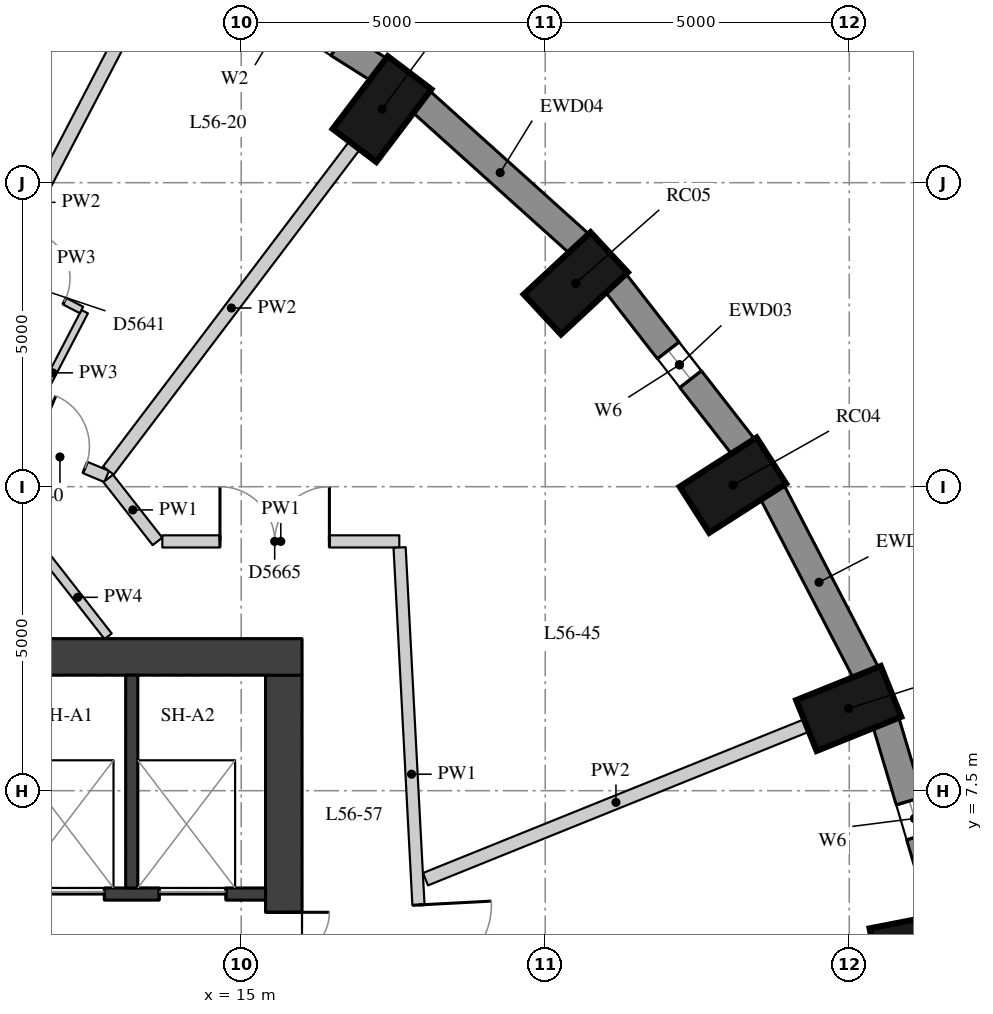
"""IFC4 building model, lengths in metres.
Left out: names, types, materials, properties, quantities, classifications, styles, units other than length and angle.
Written with IfcOpenShell. Run it as: python <this file> out.ifc"""

import sys

from ifc_helpers import new_model, si_unit, direction, frame, frame_2d, origin, origin_2d, place, context, subcontext, project, spatial, rectangle, extrude, element, fill, save


model = new_model("IFC4")
c1 = context("Model", 3, precision=1e-05, world=origin(), true_north=direction((0.0, 1.0)))
c2 = subcontext(c1, "Body", "Model", "MODEL_VIEW")
j1 = project(units=[si_unit("LENGTHUNIT", "METRE"), si_unit("PLANEANGLEUNIT", "RADIAN")], contexts=[c1])
p1 = place(None, origin())
s1 = spatial("IfcSite", under=j1, at=p1, CompositionType="ELEMENT")
p2 = place(p1, origin())
s2 = spatial("IfcBuilding", under=s1, at=p2, CompositionType="ELEMENT")
p3 = place(p2, frame((0.0, 0.0, 199.1)))
s3 = spatial("IfcBuildingStorey", under=s2, at=p3, CompositionType="ELEMENT", Elevation=199.1)
for number, where, z_axis, x_axis in (
    (1, (26.157, 4.937, 0.0), (0.0, 0.0, 1.0), (0.981, 0.192, 0.0)),
    (2, (24.991, 8.852, 0.0), (0.0, 0.0, 1.0), (0.927, 0.374, 0.0)),
    (3, (23.087, 12.525, 0.0), (0.0, 0.0, 1.0), (0.842, 0.539, 0.0)),
    (4, (20.502, 15.845, 0.0), (0.0, 0.0, 1.0), (0.732, 0.681, 0.0)),
    (5, (17.316, 18.71, 0.0), (0.0, 0.0, 1.0), (0.604, 0.797, 0.0)),
):
    element("IfcColumn", number, at=place(p3, frame(where, z_axis=z_axis, x_axis=x_axis)), inside=s3, PredefinedType="COLUMN", context=c2, shape_type="SweptSolid", body=[
        extrude(rectangle(XDim=1.5, YDim=0.9, at=origin_2d()), origin(), (0.0, 0.0, 1.0), 3.3),
    ])
p4 = place(p3, frame((26.548, 5.452, 0.0), z_axis=(0.0, 0.0, 1.0), x_axis=(-0.285444972963, 0.958395099847, 0.0)))
e6 = element("IfcWall", 6, at=p4, inside=s3, PredefinedType="SOLIDWALL", context=c2, shape_type="SweptSolid", body=[
    extrude(rectangle(XDim=3.32, YDim=0.45, at=frame_2d((1.66, 0.0))), origin(), (0.0, 0.0, 1.0), 3.02),
])
p5 = place(p4, frame((1.36, 0.0, 0.4)))
e7 = element("IfcOpeningElement", 7, at=p5, cuts=e6, PredefinedType="OPENING", context=c2, shape_type="SweptSolid", body=[
    extrude(rectangle(XDim=0.6, YDim=1.75, at=frame_2d((0.3, 0.875))), frame((0.0, 0.235, 0.0), z_axis=(0.0, -1.0, 0.0), x_axis=(1.0, 0.0, 0.0)), (0.0, 0.0, 1.0), 0.47),
])
p6 = place(p3, frame((25.278, 9.432, 0.0), z_axis=(0.0, 0.0, 1.0), x_axis=(-0.460175500475, 0.887827972505, 0.0)))
e8 = element("IfcWall", 8, at=p6, inside=s3, PredefinedType="SOLIDWALL", context=c2, shape_type="SweptSolid", body=[
    extrude(rectangle(XDim=3.371, YDim=0.45, at=frame_2d((1.685, 0.0))), origin(), (0.0, 0.0, 1.0), 3.02),
])
p7 = place(p3, frame((23.263, 13.148, 0.0), z_axis=(0.0, 0.0, 1.0), x_axis=(-0.614220816451, 0.789134201919, 0.0)))
e9 = element("IfcWall", 9, at=p7, inside=s3, PredefinedType="SOLIDWALL", context=c2, shape_type="SweptSolid", body=[
    extrude(rectangle(XDim=3.438, YDim=0.45, at=frame_2d((1.719, 0.0))), origin(), (0.0, 0.0, 1.0), 3.02),
])
p8 = place(p7, frame((1.419, 0.0, 0.4)))
e10 = element("IfcOpeningElement", 10, at=p8, cuts=e9, PredefinedType="OPENING", context=c2, shape_type="SweptSolid", body=[
    extrude(rectangle(XDim=0.6, YDim=1.75, at=frame_2d((0.3, 0.875))), frame((0.0, 0.235, 0.0), z_axis=(0.0, -1.0, 0.0), x_axis=(1.0, 0.0, 0.0)), (0.0, 0.0, 1.0), 0.47),
])
p9 = place(p3, frame((20.565, 16.49, 0.0), z_axis=(0.0, 0.0, 1.0), x_axis=(-0.743442727602, 0.668799604348, 0.0)))
e11 = element("IfcWall", 11, at=p9, inside=s3, PredefinedType="SOLIDWALL", context=c2, shape_type="SweptSolid", body=[
    extrude(rectangle(XDim=3.513, YDim=0.45, at=frame_2d((1.756, 0.0))), origin(), (0.0, 0.0, 1.0), 3.02),
])
p10 = place(p3, frame((17.267, 19.358, 0.0), z_axis=(0.0, 0.0, 1.0), x_axis=(-0.846119146727, 0.532993798783, 0.0)))
e12 = element("IfcWall", 12, at=p10, inside=s3, PredefinedType="SOLIDWALL", context=c2, shape_type="SweptSolid", body=[
    extrude(rectangle(XDim=3.587, YDim=0.45, at=frame_2d((1.793, 0.0))), origin(), (0.0, 0.0, 1.0), 3.02),
])
p11 = place(p10, frame((0.793, 0.0, 0.4)))
e13 = element("IfcOpeningElement", 13, at=p11, cuts=e12, PredefinedType="OPENING", context=c2, shape_type="SweptSolid", body=[
    extrude(rectangle(XDim=2.0, YDim=1.75, at=frame_2d((1.0, 0.875))), frame((0.0, 0.235, 0.0), z_axis=(0.0, -1.0, 0.0), x_axis=(1.0, 0.0, 0.0)), (0.0, 0.0, 1.0), 0.47),
])
p12 = place(p3, frame((15.7, -9.4, 0.0), z_axis=(0.0, 0.0, 1.0), x_axis=(0.0, 1.0, 0.0)))
e14 = element("IfcWall", 14, at=p12, inside=s3, PredefinedType="SHEAR", context=c2, shape_type="SweptSolid", body=[
    extrude(rectangle(XDim=18.8, YDim=0.6, at=frame_2d((9.4, 0.0))), origin(), (0.0, 0.0, 1.0), 3.02),
])
p13 = place(p12, frame((13.4, 0.0, 0.0)))
e15 = element("IfcOpeningElement", 15, at=p13, cuts=e14, PredefinedType="OPENING", context=c2, shape_type="SweptSolid", body=[
    extrude(rectangle(XDim=1.5, YDim=2.1, at=frame_2d((0.75, 1.05))), frame((0.0, 0.31, 0.0), z_axis=(0.0, -1.0, 0.0), x_axis=(1.0, 0.0, 0.0)), (0.0, 0.0, 1.0), 0.62),
])
p14 = place(p12, frame((3.9, 0.0, 0.0)))
e16 = element("IfcOpeningElement", 16, at=p14, cuts=e14, PredefinedType="OPENING", context=c2, shape_type="SweptSolid", body=[
    extrude(rectangle(XDim=1.5, YDim=2.1, at=frame_2d((0.75, 1.05))), frame((0.0, 0.31, 0.0), z_axis=(0.0, -1.0, 0.0), x_axis=(1.0, 0.0, 0.0)), (0.0, 0.0, 1.0), 0.62),
])
p15 = place(p3, frame((4.0, 9.7, 0.0), z_axis=(0.0, 0.0, 1.0), x_axis=(1.0, 0.0, 0.0)))
e17 = element("IfcWall", 17, at=p15, inside=s3, PredefinedType="SHEAR", context=c2, shape_type="SweptSolid", body=[
    extrude(rectangle(XDim=12.0, YDim=0.6, at=frame_2d((6.0, 0.0))), origin(), (0.0, 0.0, 1.0), 3.02),
])
p16 = place(p3, frame((4.6, 5.8, 0.0), z_axis=(0.0, 0.0, 1.0), x_axis=(1.0, 0.0, 0.0)))
e18 = element("IfcWall", 18, at=p16, inside=s3, PredefinedType="SHEAR", context=c2, shape_type="SweptSolid", body=[
    extrude(rectangle(XDim=10.8, YDim=0.2, at=frame_2d((5.4, 0.0))), origin(), (0.0, 0.0, 1.0), 3.02),
])
p17 = place(p16, frame((7.05, 0.0, 0.0)))
e19 = element("IfcOpeningElement", 19, at=p17, cuts=e18, PredefinedType="OPENING", context=c2, shape_type="SweptSolid", body=[
    extrude(rectangle(XDim=1.1, YDim=2.1, at=frame_2d((0.55, 1.05))), frame((0.0, 0.11, 0.0), z_axis=(0.0, -1.0, 0.0), x_axis=(1.0, 0.0, 0.0)), (0.0, 0.0, 1.0), 0.22),
])
p18 = place(p16, frame((9.05, 0.0, 0.0)))
e20 = element("IfcOpeningElement", 20, at=p18, cuts=e18, PredefinedType="OPENING", context=c2, shape_type="SweptSolid", body=[
    extrude(rectangle(XDim=1.1, YDim=2.1, at=frame_2d((0.55, 1.05))), frame((0.0, 0.11, 0.0), z_axis=(0.0, -1.0, 0.0), x_axis=(1.0, 0.0, 0.0)), (0.0, 0.0, 1.0), 0.22),
])
p19 = place(p3, frame((13.2, 5.9, 0.0), z_axis=(0.0, 0.0, 1.0), x_axis=(0.0, 1.0, 0.0)))
e21 = element("IfcWall", 21, at=p19, inside=s3, PredefinedType="SHEAR", context=c2, shape_type="SweptSolid", body=[
    extrude(rectangle(XDim=3.5, YDim=0.2, at=frame_2d((1.75, 0.0))), origin(), (0.0, 0.0, 1.0), 3.02),
])
p20 = place(p3, frame((4.052, 16.323, 0.0), z_axis=(0.0, 0.0, 1.0), x_axis=(0.922513794011, -0.385964117322, 0.0)))
e22 = element("IfcWall", 22, at=p20, inside=s3, PredefinedType="PARTITIONING", context=c2, shape_type="SweptSolid", body=[
    extrude(rectangle(XDim=9.47, YDim=0.2, at=frame_2d((4.735, 0.0))), origin(), (0.0, 0.0, 1.0), 3.02),
])
p21 = place(p20, frame((8.186, 0.0, 0.0)))
e23 = element("IfcOpeningElement", 23, at=p21, cuts=e22, PredefinedType="OPENING", context=c2, shape_type="SweptSolid", body=[
    extrude(rectangle(XDim=0.9, YDim=2.1, at=frame_2d((0.45, 1.05))), frame((0.0, 0.11, 0.0), z_axis=(0.0, -1.0, 0.0), x_axis=(1.0, 0.0, 0.0)), (0.0, 0.0, 1.0), 0.22),
])
p22 = place(p20, frame((2.639, 0.0, 0.0)))
e24 = element("IfcOpeningElement", 24, at=p22, cuts=e22, PredefinedType="OPENING", context=c2, shape_type="SweptSolid", body=[
    extrude(rectangle(XDim=1.1, YDim=2.1, at=frame_2d((0.55, 1.05))), frame((0.0, 0.11, 0.0), z_axis=(0.0, -1.0, 0.0), x_axis=(1.0, 0.0, 0.0)), (0.0, 0.0, 1.0), 0.22),
])
p23 = place(p3, frame((12.812, 12.636, 0.0), z_axis=(0.0, 0.0, 1.0), x_axis=(0.616123044723, -0.787649918277, 0.0)))
e25 = element("IfcWall", 25, at=p23, inside=s3, PredefinedType="PARTITIONING", context=c2, shape_type="SweptSolid", body=[
    extrude(rectangle(XDim=1.315, YDim=0.2, at=frame_2d((0.658, 0.0))), origin(), (0.0, 0.0, 1.0), 3.02),
])
p24 = place(p3, frame((13.703, 11.6, 0.0), z_axis=(0.0, 0.0, 1.0), x_axis=(1.0, 0.0, 0.0)))
e26 = element("IfcWall", 26, at=p24, inside=s3, PredefinedType="PARTITIONING", context=c2, shape_type="SweptSolid", body=[
    extrude(rectangle(XDim=3.897, YDim=0.2, at=frame_2d((1.949, 0.0))), origin(), (0.0, 0.0, 1.0), 3.02),
])
p25 = place(p24, frame((0.948, 0.0, 0.0)))
e27 = element("IfcOpeningElement", 27, at=p25, cuts=e26, PredefinedType="OPENING", context=c2, shape_type="SweptSolid", body=[
    extrude(rectangle(XDim=1.8, YDim=2.1, at=frame_2d((0.9, 1.05))), frame((0.0, 0.11, 0.0), z_axis=(0.0, -1.0, 0.0), x_axis=(1.0, 0.0, 0.0)), (0.0, 0.0, 1.0), 0.22),
])
p26 = place(p3, frame((17.605, 11.5, 0.0), z_axis=(0.0, 0.0, 1.0), x_axis=(0.052701255232, -0.998610323248, 0.0)))
e28 = element("IfcWall", 28, at=p26, inside=s3, PredefinedType="PARTITIONING", context=c2, shape_type="SweptSolid", body=[
    extrude(rectangle(XDim=7.468, YDim=0.2, at=frame_2d((3.734, 0.0))), origin(), (0.0, 0.0, 1.0), 3.02),
])
p27 = place(p26, frame((5.887, 0.0, 0.0)))
e29 = element("IfcOpeningElement", 29, at=p27, cuts=e28, PredefinedType="OPENING", context=c2, shape_type="SweptSolid", body=[
    extrude(rectangle(XDim=1.2, YDim=2.1, at=frame_2d((0.6, 1.05))), frame((0.0, 0.11, 0.0), z_axis=(0.0, -1.0, 0.0), x_axis=(1.0, 0.0, 0.0)), (0.0, 0.0, 1.0), 0.22),
])
p28 = place(p3, frame((11.81, 11.321, 0.0), z_axis=(0.0, 0.0, 1.0), x_axis=(0.615964296608, -0.787774069962, 0.0)))
e30 = element("IfcWall", 30, at=p28, inside=s3, PredefinedType="PARTITIONING", context=c2, shape_type="SweptSolid", body=[
    extrude(rectangle(XDim=1.627, YDim=0.15, at=frame_2d((0.813, 0.0))), origin(), (0.0, 0.0, 1.0), 3.02),
])
p29 = place(p3, frame((24.295, 8.571, 0.0), z_axis=(0.0, 0.0, 1.0), x_axis=(-0.927395972896, -0.374081153571, 0.0)))
e31 = element("IfcWall", 31, at=p29, inside=s3, PredefinedType="PARTITIONING", context=c2, shape_type="SweptSolid", body=[
    extrude(rectangle(XDim=6.755, YDim=0.22, at=frame_2d((3.377, 0.0))), origin(), (0.0, 0.0, 1.0), 3.02),
])
p30 = place(p3, frame((16.863, 18.113, 0.0), z_axis=(0.0, 0.0, 1.0), x_axis=(-0.603604669643, -0.797283765535, 0.0)))
e32 = element("IfcWall", 32, at=p30, inside=s3, PredefinedType="PARTITIONING", context=c2, shape_type="SweptSolid", body=[
    extrude(rectangle(XDim=6.707, YDim=0.22, at=frame_2d((3.354, 0.0))), origin(), (0.0, 0.0, 1.0), 3.02),
])
p31 = place(p3, frame((13.279, 20.37, 0.0), z_axis=(0.0, 0.0, 1.0), x_axis=(-0.462003878414, -0.886877903846, 0.0)))
e33 = element("IfcWall", 33, at=p31, inside=s3, PredefinedType="PARTITIONING", context=c2, shape_type="SweptSolid", body=[
    extrude(rectangle(XDim=7.2, YDim=0.22, at=frame_2d((3.6, 0.0))), origin(), (0.0, 0.0, 1.0), 3.02),
])
p32 = place(p3, frame((11.378, 13.366, 0.0), z_axis=(0.0, 0.0, 1.0), x_axis=(0.461999655972, 0.886880103442, 0.0)))
e34 = element("IfcWall", 34, at=p32, inside=s3, PredefinedType="PARTITIONING", context=c2, shape_type="SweptSolid", body=[
    extrude(rectangle(XDim=2.269, YDim=0.12, at=frame_2d((1.135, 0.0))), origin(), (0.0, 0.0, 1.0), 3.02),
])
p33 = place(p3, frame((12.373, 15.406, 0.0), z_axis=(0.0, 0.0, 1.0), x_axis=(-0.88690955386, 0.461943116922, 0.0)))
e35 = element("IfcWall", 35, at=p33, inside=s3, PredefinedType="PARTITIONING", context=c2, shape_type="SweptSolid", body=[
    extrude(rectangle(XDim=1.38, YDim=0.12, at=frame_2d((0.69, 0.0))), origin(), (0.0, 0.0, 1.0), 3.02),
])
p34 = place(p33, frame((0.315, 0.0, 0.0)))
e36 = element("IfcOpeningElement", 36, at=p34, cuts=e35, PredefinedType="OPENING", context=c2, shape_type="SweptSolid", body=[
    extrude(rectangle(XDim=0.8, YDim=2.1, at=frame_2d((0.4, 1.05))), frame((0.0, 0.07, 0.0), z_axis=(0.0, -1.0, 0.0), x_axis=(1.0, 0.0, 0.0)), (0.0, 0.0, 1.0), 0.14),
])
p35 = place(p5, origin())
e37 = element("IfcWindow", 37, at=p35, inside=s3, PartitioningType="SINGLE_PANEL", PredefinedType="WINDOW", context=c2, shape_type="SweptSolid", body=[
    extrude(rectangle(XDim=0.6, YDim=1.75, at=frame_2d((0.3, 0.875))), frame((0.0, 0.035, 0.0), z_axis=(0.0, -1.0, 0.0), x_axis=(1.0, 0.0, 0.0)), (0.0, 0.0, 1.0), 0.06),
])
fill(e7, e37)
p36 = place(p8, origin())
e38 = element("IfcWindow", 38, at=p36, inside=s3, PartitioningType="SINGLE_PANEL", PredefinedType="WINDOW", context=c2, shape_type="SweptSolid", body=[
    extrude(rectangle(XDim=0.6, YDim=1.75, at=frame_2d((0.3, 0.875))), frame((0.0, 0.035, 0.0), z_axis=(0.0, -1.0, 0.0), x_axis=(1.0, 0.0, 0.0)), (0.0, 0.0, 1.0), 0.06),
])
fill(e10, e38)
p37 = place(p13, origin())
e39 = element("IfcDoor", 39, at=p37, inside=s3, OperationType="DOUBLE_DOOR_SINGLE_SWING", PredefinedType="DOOR", context=c2, shape_type="SweptSolid", body=[
    extrude(rectangle(XDim=1.5, YDim=2.1, at=frame_2d((0.75, 1.05))), frame((0.0, 0.025, 0.0), z_axis=(0.0, -1.0, 0.0), x_axis=(1.0, 0.0, 0.0)), (0.0, 0.0, 1.0), 0.05),
])
fill(e15, e39)
p38 = place(p17, origin())
e40 = element("IfcDoor", 40, at=p38, inside=s3, OperationType="DOUBLE_DOOR_SLIDING", PredefinedType="DOOR", context=c2, shape_type="SweptSolid", body=[
    extrude(rectangle(XDim=1.1, YDim=2.1, at=frame_2d((0.55, 1.05))), frame((0.0, 0.025, 0.0), z_axis=(0.0, -1.0, 0.0), x_axis=(1.0, 0.0, 0.0)), (0.0, 0.0, 1.0), 0.05),
])
fill(e19, e40)
p39 = place(p18, origin())
e41 = element("IfcDoor", 41, at=p39, inside=s3, OperationType="DOUBLE_DOOR_SLIDING", PredefinedType="DOOR", context=c2, shape_type="SweptSolid", body=[
    extrude(rectangle(XDim=1.1, YDim=2.1, at=frame_2d((0.55, 1.05))), frame((0.0, 0.025, 0.0), z_axis=(0.0, -1.0, 0.0), x_axis=(1.0, 0.0, 0.0)), (0.0, 0.0, 1.0), 0.05),
])
fill(e20, e41)
p40 = place(p21, origin())
e42 = element("IfcDoor", 42, at=p40, inside=s3, OperationType="SINGLE_SWING_LEFT", PredefinedType="DOOR", context=c2, shape_type="SweptSolid", body=[
    extrude(rectangle(XDim=0.9, YDim=2.1, at=frame_2d((0.45, 1.05))), frame((0.0, 0.025, 0.0), z_axis=(0.0, -1.0, 0.0), x_axis=(1.0, 0.0, 0.0)), (0.0, 0.0, 1.0), 0.05),
])
fill(e23, e42)
p41 = place(p34, origin())
e43 = element("IfcDoor", 43, at=p41, inside=s3, OperationType="SINGLE_SWING_LEFT", PredefinedType="DOOR", context=c2, shape_type="SweptSolid", body=[
    extrude(rectangle(XDim=0.8, YDim=2.1, at=frame_2d((0.4, 1.05))), frame((0.0, 0.025, 0.0), z_axis=(0.0, -1.0, 0.0), x_axis=(1.0, 0.0, 0.0)), (0.0, 0.0, 1.0), 0.05),
])
fill(e36, e43)
p42 = place(p27, origin())
e44 = element("IfcDoor", 44, at=p42, inside=s3, OperationType="SINGLE_SWING_LEFT", PredefinedType="DOOR", context=c2, shape_type="SweptSolid", body=[
    extrude(rectangle(XDim=1.2, YDim=2.1, at=frame_2d((0.6, 1.05))), frame((0.0, 0.025, 0.0), z_axis=(0.0, -1.0, 0.0), x_axis=(1.0, 0.0, 0.0)), (0.0, 0.0, 1.0), 0.05),
])
fill(e29, e44)
p43 = place(p25, origin())
e45 = element("IfcDoor", 45, at=p43, inside=s3, OperationType="DOUBLE_DOOR_SINGLE_SWING", PredefinedType="DOOR", context=c2, shape_type="SweptSolid", body=[
    extrude(rectangle(XDim=1.8, YDim=2.1, at=frame_2d((0.9, 1.05))), frame((0.0, 0.025, 0.0), z_axis=(0.0, -1.0, 0.0), x_axis=(1.0, 0.0, 0.0)), (0.0, 0.0, 1.0), 0.05),
])
fill(e27, e45)
save(model, sys.argv[1])
